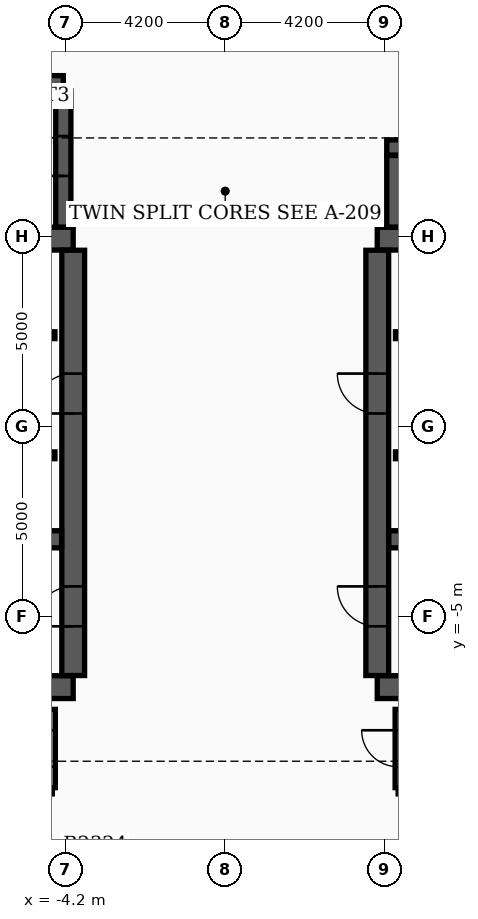
"""IFC4 building model, lengths in metres.
Left out: names, types, materials, properties, quantities, classifications, styles, units other than length and angle.
Written with IfcOpenShell. Run it as: python <this file> out.ifc"""

import sys

from ifc_helpers import new_model, si_unit, direction, frame, frame_2d, origin, place, context, subcontext, project, spatial, rectangle, extrude, element, fill, save


model = new_model("IFC4")
c1 = context("Model", 3, precision=1e-05, world=origin(), true_north=direction((0.0, 1.0)))
c2 = subcontext(c1, "Body", "Model", "MODEL_VIEW")
j1 = project(units=[si_unit("LENGTHUNIT", "METRE"), si_unit("PLANEANGLEUNIT", "RADIAN")], contexts=[c1])
p1 = place(None, origin())
s1 = spatial("IfcSite", under=j1, at=p1, CompositionType="ELEMENT")
p2 = place(p1, origin())
s2 = spatial("IfcBuilding", under=s1, at=p2, CompositionType="ELEMENT")
p3 = place(p2, frame((0.0, 0.0, 148.8)))
s3 = spatial("IfcBuildingStorey", under=s2, at=p3, CompositionType="ELEMENT", Elevation=148.8)
for number, where, z_axis, x_axis in (
    (1, (-12.4, -6.85, 0.0), (0.0, 0.0, 1.0), (1.0, 0.0, 0.0)),
    (2, (-12.4, 4.95, 0.0), (0.0, 0.0, 1.0), (1.0, 0.0, 0.0)),
):
    element("IfcWall", number, at=place(p3, frame(where, z_axis=z_axis, x_axis=x_axis)), inside=s3, PredefinedType="SHEAR", context=c2, shape_type="SweptSolid", body=[
        extrude(rectangle(XDim=8.4, YDim=0.6, at=frame_2d((4.2, 0.0))), origin(), (0.0, 0.0, 1.0), 3.7),
    ])
p4 = place(p3, frame((-4.0, -6.545, 0.0), z_axis=(0.0, 0.0, 1.0), x_axis=(0.0, 1.0, 0.0)))
e3 = element("IfcWall", 3, at=p4, inside=s3, PredefinedType="SHEAR", context=c2, shape_type="SweptSolid", body=[
    extrude(rectangle(XDim=11.19, YDim=0.6, at=frame_2d((5.595, 0.0))), origin(), (0.0, 0.0, 1.0), 3.7),
])
p5 = place(p4, frame((1.295, 0.0, 0.0)))
e4 = element("IfcOpeningElement", 4, at=p5, cuts=e3, PredefinedType="OPENING", context=c2, shape_type="SweptSolid", body=[
    extrude(rectangle(XDim=1.05, YDim=2.15, at=frame_2d((0.525, 1.075))), frame((0.0, 0.31, 0.0), z_axis=(0.0, -1.0, 0.0), x_axis=(1.0, 0.0, 0.0)), (0.0, 0.0, 1.0), 0.62),
])
p6 = place(p4, frame((6.895, 0.0, 0.0)))
e5 = element("IfcOpeningElement", 5, at=p6, cuts=e3, PredefinedType="OPENING", context=c2, shape_type="SweptSolid", body=[
    extrude(rectangle(XDim=1.05, YDim=2.15, at=frame_2d((0.525, 1.075))), frame((0.0, 0.31, 0.0), z_axis=(0.0, -1.0, 0.0), x_axis=(1.0, 0.0, 0.0)), (0.0, 0.0, 1.0), 0.62),
])
p7 = place(p3, frame((-12.095, -2.96, 0.0), z_axis=(0.0, 0.0, 1.0), x_axis=(1.0, 0.0, 0.0)))
e6 = element("IfcWall", 6, at=p7, inside=s3, PredefinedType="SHEAR", context=c2, shape_type="SweptSolid", body=[
    extrude(rectangle(XDim=7.79, YDim=0.45, at=frame_2d((3.895, 0.0))), origin(), (0.0, 0.0, 1.0), 3.7),
])
for number, where, z_axis, x_axis in (
    (7, (4.0, -6.85, 0.0), (0.0, 0.0, 1.0), (1.0, 0.0, 0.0)),
    (8, (4.0, 4.95, 0.0), (0.0, 0.0, 1.0), (1.0, 0.0, 0.0)),
):
    element("IfcWall", number, at=place(p3, frame(where, z_axis=z_axis, x_axis=x_axis)), inside=s3, PredefinedType="SHEAR", context=c2, shape_type="SweptSolid", body=[
        extrude(rectangle(XDim=8.4, YDim=0.6, at=frame_2d((4.2, 0.0))), origin(), (0.0, 0.0, 1.0), 3.7),
    ])
p8 = place(p3, frame((4.0, -6.545, 0.0), z_axis=(0.0, 0.0, 1.0), x_axis=(0.0, 1.0, 0.0)))
e9 = element("IfcWall", 9, at=p8, inside=s3, PredefinedType="SHEAR", context=c2, shape_type="SweptSolid", body=[
    extrude(rectangle(XDim=11.19, YDim=0.6, at=frame_2d((5.595, 0.0))), origin(), (0.0, 0.0, 1.0), 3.7),
])
p9 = place(p8, frame((1.295, 0.0, 0.0)))
e10 = element("IfcOpeningElement", 10, at=p9, cuts=e9, PredefinedType="OPENING", context=c2, shape_type="SweptSolid", body=[
    extrude(rectangle(XDim=1.05, YDim=2.15, at=frame_2d((0.525, 1.075))), frame((0.0, 0.31, 0.0), z_axis=(0.0, -1.0, 0.0), x_axis=(1.0, 0.0, 0.0)), (0.0, 0.0, 1.0), 0.62),
])
p10 = place(p8, frame((6.895, 0.0, 0.0)))
e11 = element("IfcOpeningElement", 11, at=p10, cuts=e9, PredefinedType="OPENING", context=c2, shape_type="SweptSolid", body=[
    extrude(rectangle(XDim=1.05, YDim=2.15, at=frame_2d((0.525, 1.075))), frame((0.0, 0.31, 0.0), z_axis=(0.0, -1.0, 0.0), x_axis=(1.0, 0.0, 0.0)), (0.0, 0.0, 1.0), 0.62),
])
p11 = place(p3, frame((4.305, -2.96, 0.0), z_axis=(0.0, 0.0, 1.0), x_axis=(1.0, 0.0, 0.0)))
e12 = element("IfcWall", 12, at=p11, inside=s3, PredefinedType="SHEAR", context=c2, shape_type="SweptSolid", body=[
    extrude(rectangle(XDim=7.79, YDim=0.45, at=frame_2d((3.895, 0.0))), origin(), (0.0, 0.0, 1.0), 3.7),
])
p12 = place(p3, frame((-12.22, 9.04, 0.0), z_axis=(0.0, 0.0, 1.0), x_axis=(1.0, 0.0, 0.0)))
e13 = element("IfcWall", 13, at=p12, inside=s3, PredefinedType="SHEAR", context=c2, shape_type="SweptSolid", body=[
    extrude(rectangle(XDim=7.96, YDim=0.4, at=frame_2d((3.98, 0.0))), origin(), (0.0, 0.0, 1.0), 3.7),
])
p13 = place(p3, frame((-4.26, 5.255, 0.0), z_axis=(0.0, 0.0, 1.0), x_axis=(0.0, 1.0, 0.0)))
e14 = element("IfcWall", 14, at=p13, inside=s3, PredefinedType="SHEAR", context=c2, shape_type="SweptSolid", body=[
    extrude(rectangle(XDim=3.58, YDim=0.4, at=frame_2d((1.79, 0.0))), origin(), (0.0, 0.0, 1.0), 3.7),
])
p14 = place(p13, frame((1.345, 0.0, 0.0)))
e15 = element("IfcOpeningElement", 15, at=p14, cuts=e14, PredefinedType="OPENING", context=c2, shape_type="SweptSolid", body=[
    extrude(rectangle(XDim=1.05, YDim=2.15, at=frame_2d((0.525, 1.075))), frame((0.0, 0.21, 0.0), z_axis=(0.0, -1.0, 0.0), x_axis=(1.0, 0.0, 0.0)), (0.0, 0.0, 1.0), 0.42),
])
p15 = place(p3, frame((4.45, 5.255, 0.0), z_axis=(0.0, 0.0, 1.0), x_axis=(0.0, 1.0, 0.0)))
e16 = element("IfcWall", 16, at=p15, inside=s3, PredefinedType="SHEAR", context=c2, shape_type="SweptSolid", body=[
    extrude(rectangle(XDim=1.885, YDim=0.4, at=frame_2d((0.942, 0.0))), origin(), (0.0, 0.0, 1.0), 3.7),
])
p16 = place(p3, frame((4.25, 7.35, 0.0), z_axis=(0.0, 0.0, 1.0), x_axis=(1.0, 0.0, 0.0)))
e17 = element("IfcWall", 17, at=p16, inside=s3, PredefinedType="SHEAR", context=c2, shape_type="SweptSolid", body=[
    extrude(rectangle(XDim=5.4, YDim=0.4, at=frame_2d((2.7, 0.0))), origin(), (0.0, 0.0, 1.0), 3.7),
])
p17 = place(p3, frame((-11.9, 2.41, 0.0), z_axis=(0.0, 0.0, 1.0), x_axis=(1.0, 0.0, 0.0)))
e18 = element("IfcWall", 18, at=p17, inside=s3, PredefinedType="SOLIDWALL", context=c2, shape_type="SweptSolid", body=[
    extrude(rectangle(XDim=7.42, YDim=0.18, at=frame_2d((3.71, 0.0))), origin(), (0.0, 0.0, 1.0), 2.96),
])
p18 = place(p17, frame((0.55, 0.0, 0.0)))
e19 = element("IfcOpeningElement", 19, at=p18, cuts=e18, PredefinedType="OPENING", context=c2, shape_type="SweptSolid", body=[
    extrude(rectangle(XDim=1.1, YDim=2.15, at=frame_2d((0.55, 1.075))), frame((0.0, 0.1, 0.0), z_axis=(0.0, -1.0, 0.0), x_axis=(1.0, 0.0, 0.0)), (0.0, 0.0, 1.0), 0.2),
])
p19 = place(p17, frame((4.9, 0.0, 0.0)))
e20 = element("IfcOpeningElement", 20, at=p19, cuts=e18, PredefinedType="OPENING", context=c2, shape_type="SweptSolid", body=[
    extrude(rectangle(XDim=0.88, YDim=2.1, at=frame_2d((0.44, 1.05))), frame((0.0, 0.1, 0.0), z_axis=(0.0, -1.0, 0.0), x_axis=(1.0, 0.0, 0.0)), (0.0, 0.0, 1.0), 0.2),
])
p20 = place(p3, frame((4.48, 2.41, 0.0), z_axis=(0.0, 0.0, 1.0), x_axis=(1.0, 0.0, 0.0)))
e21 = element("IfcWall", 21, at=p20, inside=s3, PredefinedType="SOLIDWALL", context=c2, shape_type="SweptSolid", body=[
    extrude(rectangle(XDim=7.42, YDim=0.18, at=frame_2d((3.71, 0.0))), origin(), (0.0, 0.0, 1.0), 2.96),
])
p21 = place(p20, frame((5.67, 0.0, 0.0)))
e22 = element("IfcOpeningElement", 22, at=p21, cuts=e21, PredefinedType="OPENING", context=c2, shape_type="SweptSolid", body=[
    extrude(rectangle(XDim=1.1, YDim=2.15, at=frame_2d((0.55, 1.075))), frame((0.0, 0.1, 0.0), z_axis=(0.0, -1.0, 0.0), x_axis=(1.0, 0.0, 0.0)), (0.0, 0.0, 1.0), 0.2),
])
p22 = place(p20, frame((1.6, 0.0, 0.0)))
e23 = element("IfcOpeningElement", 23, at=p22, cuts=e21, PredefinedType="OPENING", context=c2, shape_type="SweptSolid", body=[
    extrude(rectangle(XDim=0.88, YDim=2.1, at=frame_2d((0.44, 1.05))), frame((0.0, 0.1, 0.0), z_axis=(0.0, -1.0, 0.0), x_axis=(1.0, 0.0, 0.0)), (0.0, 0.0, 1.0), 0.2),
])
p23 = place(p3, frame((-11.9, -0.75, 0.0), z_axis=(0.0, 0.0, 1.0), x_axis=(1.0, 0.0, 0.0)))
e24 = element("IfcWall", 24, at=p23, inside=s3, PredefinedType="SOLIDWALL", context=c2, shape_type="SweptSolid", body=[
    extrude(rectangle(XDim=7.42, YDim=0.18, at=frame_2d((3.71, 0.0))), origin(), (0.0, 0.0, 1.0), 2.96),
])
p24 = place(p23, frame((0.45, 0.0, 0.0)))
e25 = element("IfcOpeningElement", 25, at=p24, cuts=e24, PredefinedType="OPENING", context=c2, shape_type="SweptSolid", body=[
    extrude(rectangle(XDim=1.1, YDim=2.15, at=frame_2d((0.55, 1.075))), frame((0.0, 0.1, 0.0), z_axis=(0.0, -1.0, 0.0), x_axis=(1.0, 0.0, 0.0)), (0.0, 0.0, 1.0), 0.2),
])
p25 = place(p23, frame((2.35, 0.0, 0.0)))
e26 = element("IfcOpeningElement", 26, at=p25, cuts=e24, PredefinedType="OPENING", context=c2, shape_type="SweptSolid", body=[
    extrude(rectangle(XDim=1.1, YDim=2.15, at=frame_2d((0.55, 1.075))), frame((0.0, 0.1, 0.0), z_axis=(0.0, -1.0, 0.0), x_axis=(1.0, 0.0, 0.0)), (0.0, 0.0, 1.0), 0.2),
])
p26 = place(p3, frame((4.48, -0.75, 0.0), z_axis=(0.0, 0.0, 1.0), x_axis=(1.0, 0.0, 0.0)))
e27 = element("IfcWall", 27, at=p26, inside=s3, PredefinedType="SOLIDWALL", context=c2, shape_type="SweptSolid", body=[
    extrude(rectangle(XDim=7.42, YDim=0.18, at=frame_2d((3.71, 0.0))), origin(), (0.0, 0.0, 1.0), 2.96),
])
p27 = place(p26, frame((0.52, 0.0, 0.0)))
e28 = element("IfcOpeningElement", 28, at=p27, cuts=e27, PredefinedType="OPENING", context=c2, shape_type="SweptSolid", body=[
    extrude(rectangle(XDim=1.1, YDim=2.15, at=frame_2d((0.55, 1.075))), frame((0.0, 0.1, 0.0), z_axis=(0.0, -1.0, 0.0), x_axis=(1.0, 0.0, 0.0)), (0.0, 0.0, 1.0), 0.2),
])
p28 = place(p3, frame((4.55, -9.58, 0.0), z_axis=(0.0, 0.0, 1.0), x_axis=(1.0, 0.0, 0.0)))
e29 = element("IfcWall", 29, at=p28, inside=s3, PredefinedType="PARTITIONING", context=c2, shape_type="SweptSolid", body=[
    extrude(rectangle(XDim=8.1, YDim=0.16, at=frame_2d((4.05, 0.0))), origin(), (0.0, 0.0, 1.0), 2.96),
])
p29 = place(p3, frame((4.55, -9.495, 0.0), z_axis=(0.0, 0.0, 1.0), x_axis=(0.0, 1.0, 0.0)))
e30 = element("IfcWall", 30, at=p29, inside=s3, PredefinedType="PARTITIONING", context=c2, shape_type="SweptSolid", body=[
    extrude(rectangle(XDim=2.06, YDim=0.16, at=frame_2d((1.03, 0.0))), origin(), (0.0, 0.0, 1.0), 2.96),
])
p30 = place(p29, frame((0.55, 0.0, 0.0)))
e31 = element("IfcOpeningElement", 31, at=p30, cuts=e30, PredefinedType="OPENING", context=c2, shape_type="SweptSolid", body=[
    extrude(rectangle(XDim=0.96, YDim=2.15, at=frame_2d((0.48, 1.075))), frame((0.0, 0.09, 0.0), z_axis=(0.0, -1.0, 0.0), x_axis=(1.0, 0.0, 0.0)), (0.0, 0.0, 1.0), 0.18),
])
p31 = place(p3, frame((-4.55, -9.495, 0.0), z_axis=(0.0, 0.0, 1.0), x_axis=(0.0, 1.0, 0.0)))
e32 = element("IfcWall", 32, at=p31, inside=s3, PredefinedType="PARTITIONING", context=c2, shape_type="SweptSolid", body=[
    extrude(rectangle(XDim=2.06, YDim=0.16, at=frame_2d((1.03, 0.0))), origin(), (0.0, 0.0, 1.0), 2.96),
])
p32 = place(p31, frame((0.55, 0.0, 0.0)))
e33 = element("IfcOpeningElement", 33, at=p32, cuts=e32, PredefinedType="OPENING", context=c2, shape_type="SweptSolid", body=[
    extrude(rectangle(XDim=0.96, YDim=2.15, at=frame_2d((0.48, 1.075))), frame((0.0, 0.09, 0.0), z_axis=(0.0, -1.0, 0.0), x_axis=(1.0, 0.0, 0.0)), (0.0, 0.0, 1.0), 0.18),
])
p33 = place(p5, origin())
e34 = element("IfcDoor", 34, at=p33, inside=s3, OperationType="SINGLE_SWING_LEFT", PredefinedType="DOOR", context=c2, shape_type="SweptSolid", body=[
    extrude(rectangle(XDim=1.05, YDim=2.15, at=frame_2d((0.525, 1.075))), frame((0.0, 0.025, 0.0), z_axis=(0.0, -1.0, 0.0), x_axis=(1.0, 0.0, 0.0)), (0.0, 0.0, 1.0), 0.05),
])
fill(e4, e34)
p34 = place(p9, origin())
e35 = element("IfcDoor", 35, at=p34, inside=s3, OperationType="SINGLE_SWING_RIGHT", PredefinedType="DOOR", context=c2, shape_type="SweptSolid", body=[
    extrude(rectangle(XDim=1.05, YDim=2.15, at=frame_2d((0.525, 1.075))), frame((0.0, 0.025, 0.0), z_axis=(0.0, -1.0, 0.0), x_axis=(1.0, 0.0, 0.0)), (0.0, 0.0, 1.0), 0.05),
])
fill(e10, e35)
p35 = place(p6, origin())
e36 = element("IfcDoor", 36, at=p35, inside=s3, OperationType="SINGLE_SWING_LEFT", PredefinedType="DOOR", context=c2, shape_type="SweptSolid", body=[
    extrude(rectangle(XDim=1.05, YDim=2.15, at=frame_2d((0.525, 1.075))), frame((0.0, 0.025, 0.0), z_axis=(0.0, -1.0, 0.0), x_axis=(1.0, 0.0, 0.0)), (0.0, 0.0, 1.0), 0.05),
])
fill(e5, e36)
p36 = place(p10, origin())
e37 = element("IfcDoor", 37, at=p36, inside=s3, OperationType="SINGLE_SWING_RIGHT", PredefinedType="DOOR", context=c2, shape_type="SweptSolid", body=[
    extrude(rectangle(XDim=1.05, YDim=2.15, at=frame_2d((0.525, 1.075))), frame((0.0, 0.025, 0.0), z_axis=(0.0, -1.0, 0.0), x_axis=(1.0, 0.0, 0.0)), (0.0, 0.0, 1.0), 0.05),
])
fill(e11, e37)
p37 = place(p14, origin())
e38 = element("IfcDoor", 38, at=p37, inside=s3, OperationType="SINGLE_SWING_LEFT", PredefinedType="DOOR", context=c2, shape_type="SweptSolid", body=[
    extrude(rectangle(XDim=1.05, YDim=2.15, at=frame_2d((0.525, 1.075))), frame((0.0, 0.025, 0.0), z_axis=(0.0, -1.0, 0.0), x_axis=(1.0, 0.0, 0.0)), (0.0, 0.0, 1.0), 0.05),
])
fill(e15, e38)
p38 = place(p30, origin())
e39 = element("IfcDoor", 39, at=p38, inside=s3, OperationType="SINGLE_SWING_RIGHT", PredefinedType="DOOR", context=c2, shape_type="SweptSolid", body=[
    extrude(rectangle(XDim=0.96, YDim=2.15, at=frame_2d((0.48, 1.075))), frame((0.0, 0.025, 0.0), z_axis=(0.0, -1.0, 0.0), x_axis=(1.0, 0.0, 0.0)), (0.0, 0.0, 1.0), 0.05),
])
fill(e31, e39)
p39 = place(p32, origin())
e40 = element("IfcDoor", 40, at=p39, inside=s3, OperationType="SINGLE_SWING_LEFT", PredefinedType="DOOR", context=c2, shape_type="SweptSolid", body=[
    extrude(rectangle(XDim=0.96, YDim=2.15, at=frame_2d((0.48, 1.075))), frame((0.0, 0.025, 0.0), z_axis=(0.0, -1.0, 0.0), x_axis=(1.0, 0.0, 0.0)), (0.0, 0.0, 1.0), 0.05),
])
fill(e33, e40)
save(model, sys.argv[1])
